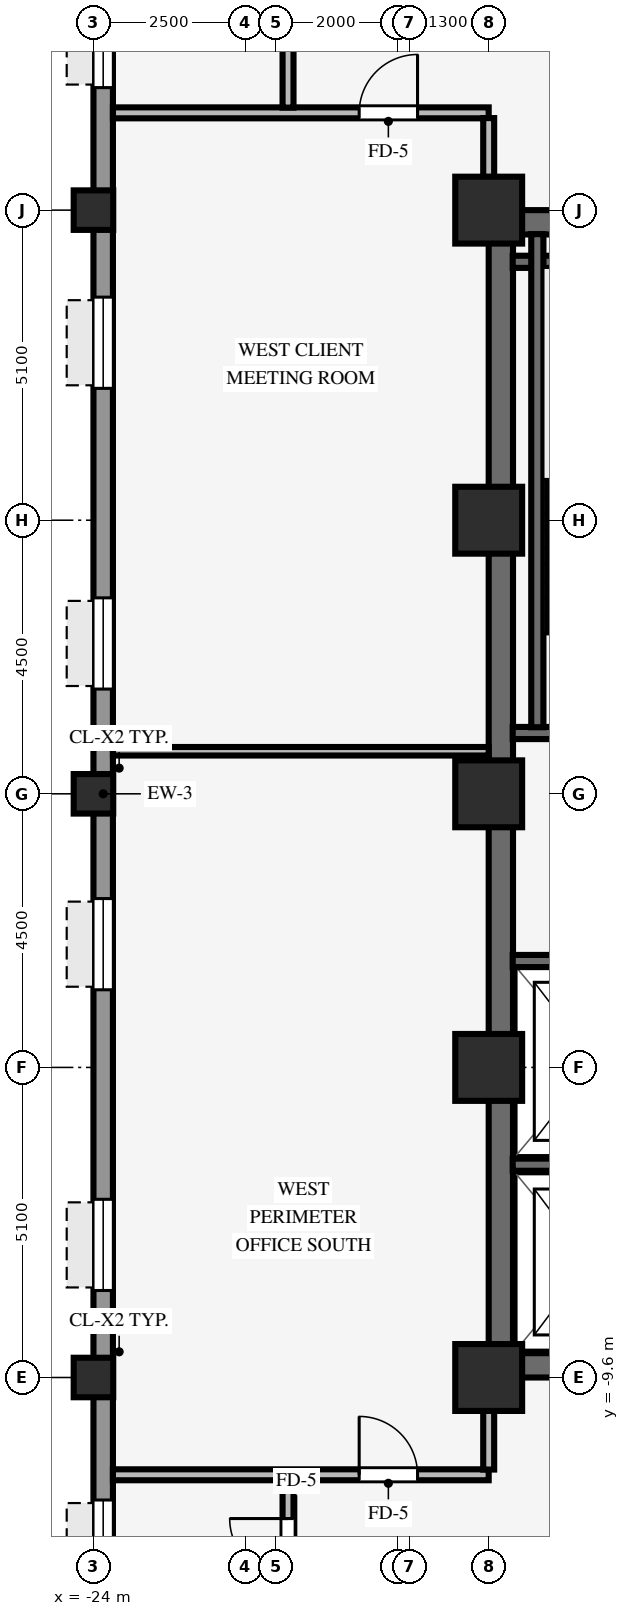
"""IFC4 building model, lengths in metres.
Left out: names, types, materials, properties, quantities, classifications, styles, units other than length and angle.
Written with IfcOpenShell. Run it as: python <this file> out.ifc"""

import sys

from ifc_helpers import new_model, si_unit, direction, frame, frame_2d, origin, origin_2d, place, context, subcontext, project, spatial, rectangle, hollow_rectangle, extrude, source, transform, mapped, element, fill, save


model = new_model("IFC4")
c1 = context("Model", 3, precision=1e-05, world=origin(), true_north=direction((0.0, 1.0)))
c2 = subcontext(c1, "Body", "Model", "MODEL_VIEW")
j1 = project(units=[si_unit("LENGTHUNIT", "METRE"), si_unit("PLANEANGLEUNIT", "RADIAN")], contexts=[c1])
p1 = place(None, origin())
s1 = spatial("IfcSite", under=j1, at=p1, CompositionType="ELEMENT")
p2 = place(p1, origin())
s2 = spatial("IfcBuilding", under=s1, at=p2, CompositionType="ELEMENT")
p3 = place(p2, frame((0.0, 0.0, 98.3)))
s3 = spatial("IfcBuildingStorey", under=s2, at=p3, CompositionType="ELEMENT", Elevation=98.3)
for number, where, z_axis, x_axis in (
    (1, (-17.5, -9.4, 0.0), (0.0, 0.0, 1.0), (1.0, 0.0, 0.0)),
    (2, (-17.5, 9.4, 0.0), (0.0, 0.0, 1.0), (1.0, 0.0, 0.0)),
):
    element("IfcWall", number, at=place(p3, frame(where, z_axis=z_axis, x_axis=x_axis)), inside=s3, PredefinedType="SHEAR", context=c2, shape_type="SweptSolid", body=[
        extrude(rectangle(XDim=8.5, YDim=0.4, at=frame_2d((4.25, 0.0))), origin(), (0.0, 0.0, 1.0), 3.37),
    ])
p4 = place(p3, frame((-17.3, -9.205, 0.0), z_axis=(0.0, 0.0, 1.0), x_axis=(0.0, 1.0, 0.0)))
e3 = element("IfcWall", 3, at=p4, inside=s3, PredefinedType="SHEAR", context=c2, shape_type="SweptSolid", body=[
    extrude(rectangle(XDim=18.41, YDim=0.4, at=frame_2d((9.205, 0.0))), origin(), (0.0, 0.0, 1.0), 3.37),
])
for number, where, z_axis, x_axis in (
    (4, (-17.5, -9.6, 0.0), (0.0, 0.0, 1.0), (1.0, 0.0, 0.0)),
    (5, (-17.5, -4.5, 0.0), (0.0, 0.0, 1.0), (1.0, 0.0, 0.0)),
    (6, (-17.5, 4.5, 0.0), (0.0, 0.0, 1.0), (1.0, 0.0, 0.0)),
    (7, (-17.5, 9.6, 0.0), (0.0, 0.0, 1.0), (1.0, 0.0, 0.0)),
    (8, (-17.5, 0.0, 0.0), (0.0, 0.0, 1.0), (1.0, 0.0, 0.0)),
):
    element("IfcColumn", number, at=place(p3, frame(where, z_axis=z_axis, x_axis=x_axis)), inside=s3, PredefinedType="COLUMN", context=c2, shape_type="SweptSolid", body=[
        extrude(rectangle(XDim=1.1, YDim=1.1, at=origin_2d()), origin(), (0.0, 0.0, 1.0), 3.37),
    ])
for number, where, z_axis, x_axis in (
    (9, (-24.0, -9.6, 0.0), (0.0, 0.0, 1.0), (1.0, 0.0, 0.0)),
    (10, (-24.0, 0.0, 0.0), (0.0, 0.0, 1.0), (1.0, 0.0, 0.0)),
    (11, (-24.0, 9.6, 0.0), (0.0, 0.0, 1.0), (1.0, 0.0, 0.0)),
):
    element("IfcColumn", number, at=place(p3, frame(where, z_axis=z_axis, x_axis=x_axis)), inside=s3, PredefinedType="COLUMN", context=c2, shape_type="SweptSolid", body=[
        extrude(hollow_rectangle(XDim=0.65, YDim=0.65, WallThickness=0.04, InnerFilletRadius=0.04, OuterFilletRadius=0.08, at=origin_2d()), origin(), (0.0, 0.0, 1.0), 3.37),
    ])
p5 = place(p3, frame((-23.84, -20.784, 0.0), z_axis=(0.0, 0.0, 1.0), x_axis=(0.0, 1.0, 0.0)))
e12 = element("IfcWall", 12, at=p5, inside=s3, PredefinedType="STANDARD", context=c2, shape_type="SweptSolid", body=[
    extrude(rectangle(XDim=41.568, YDim=0.32, at=frame_2d((20.784, 0.0))), origin(), (0.0, 0.0, 1.0), 2.705),
])
p6 = place(p5, frame((1.373, 0.0, 0.8)))
e13 = element("IfcOpeningElement", 13, at=p6, cuts=e12, PredefinedType="OPENING", context=c2, shape_type="SweptSolid", body=[
    extrude(rectangle(XDim=1.5, YDim=1.6, at=frame_2d((0.75, 0.8))), frame((0.0, 0.17, 0.0), z_axis=(0.0, -1.0, 0.0), x_axis=(1.0, 0.0, 0.0)), (0.0, 0.0, 1.0), 0.34),
])
p7 = place(p5, frame((7.669, 0.0, 0.8)))
e14 = element("IfcOpeningElement", 14, at=p7, cuts=e12, PredefinedType="OPENING", context=c2, shape_type="SweptSolid", body=[
    extrude(rectangle(XDim=1.5, YDim=1.6, at=frame_2d((0.75, 0.8))), frame((0.0, 0.17, 0.0), z_axis=(0.0, -1.0, 0.0), x_axis=(1.0, 0.0, 0.0)), (0.0, 0.0, 1.0), 0.34),
])
p8 = place(p5, frame((12.615, 0.0, 0.8)))
e15 = element("IfcOpeningElement", 15, at=p8, cuts=e12, PredefinedType="OPENING", context=c2, shape_type="SweptSolid", body=[
    extrude(rectangle(XDim=1.5, YDim=1.6, at=frame_2d((0.75, 0.8))), frame((0.0, 0.17, 0.0), z_axis=(0.0, -1.0, 0.0), x_axis=(1.0, 0.0, 0.0)), (0.0, 0.0, 1.0), 0.34),
])
p9 = place(p5, frame((17.561, 0.0, 0.8)))
e16 = element("IfcOpeningElement", 16, at=p9, cuts=e12, PredefinedType="OPENING", context=c2, shape_type="SweptSolid", body=[
    extrude(rectangle(XDim=1.5, YDim=1.6, at=frame_2d((0.75, 0.8))), frame((0.0, 0.17, 0.0), z_axis=(0.0, -1.0, 0.0), x_axis=(1.0, 0.0, 0.0)), (0.0, 0.0, 1.0), 0.34),
])
p10 = place(p5, frame((22.507, 0.0, 0.8)))
e17 = element("IfcOpeningElement", 17, at=p10, cuts=e12, PredefinedType="OPENING", context=c2, shape_type="SweptSolid", body=[
    extrude(rectangle(XDim=1.5, YDim=1.6, at=frame_2d((0.75, 0.8))), frame((0.0, 0.17, 0.0), z_axis=(0.0, -1.0, 0.0), x_axis=(1.0, 0.0, 0.0)), (0.0, 0.0, 1.0), 0.34),
])
p11 = place(p5, frame((27.453, 0.0, 0.8)))
e18 = element("IfcOpeningElement", 18, at=p11, cuts=e12, PredefinedType="OPENING", context=c2, shape_type="SweptSolid", body=[
    extrude(rectangle(XDim=1.5, YDim=1.6, at=frame_2d((0.75, 0.8))), frame((0.0, 0.17, 0.0), z_axis=(0.0, -1.0, 0.0), x_axis=(1.0, 0.0, 0.0)), (0.0, 0.0, 1.0), 0.34),
])
p12 = place(p5, frame((32.399, 0.0, 0.8)))
e19 = element("IfcOpeningElement", 19, at=p12, cuts=e12, PredefinedType="OPENING", context=c2, shape_type="SweptSolid", body=[
    extrude(rectangle(XDim=1.5, YDim=1.6, at=frame_2d((0.75, 0.8))), frame((0.0, 0.17, 0.0), z_axis=(0.0, -1.0, 0.0), x_axis=(1.0, 0.0, 0.0)), (0.0, 0.0, 1.0), 0.34),
])
p13 = place(p5, frame((38.695, 0.0, 0.8)))
e20 = element("IfcOpeningElement", 20, at=p13, cuts=e12, PredefinedType="OPENING", context=c2, shape_type="SweptSolid", body=[
    extrude(rectangle(XDim=1.5, YDim=1.6, at=frame_2d((0.75, 0.8))), frame((0.0, 0.17, 0.0), z_axis=(0.0, -1.0, 0.0), x_axis=(1.0, 0.0, 0.0)), (0.0, 0.0, 1.0), 0.34),
])
for number, where, z_axis, x_axis in (
    (21, (-17.105, 1.0, 0.0), (0.0, 0.0, 1.0), (1.0, 0.0, 0.0)),
    (22, (-17.105, 8.75, 0.0), (0.0, 0.0, 1.0), (1.0, 0.0, 0.0)),
):
    element("IfcWall", number, at=place(p3, frame(where, z_axis=z_axis, x_axis=x_axis)), inside=s3, PredefinedType="SHEAR", context=c2, shape_type="SweptSolid", body=[
        extrude(rectangle(XDim=3.57, YDim=0.2, at=frame_2d((1.785, 0.0))), origin(), (0.0, 0.0, 1.0), 3.37),
    ])
p14 = place(p3, frame((-16.7, 1.095, 0.0), z_axis=(0.0, 0.0, 1.0), x_axis=(0.0, 1.0, 0.0)))
e23 = element("IfcWall", 23, at=p14, inside=s3, PredefinedType="SHEAR", context=c2, shape_type="SweptSolid", body=[
    extrude(rectangle(XDim=8.11, YDim=0.2, at=frame_2d((4.055, 0.0))), origin(), (0.0, 0.0, 1.0), 3.37),
])
p15 = place(p3, frame((-17.105, -6.1, 0.0), z_axis=(0.0, 0.0, 1.0), x_axis=(1.0, 0.0, 0.0)))
e24 = element("IfcWall", 24, at=p15, inside=s3, PredefinedType="SHEAR", context=c2, shape_type="SweptSolid", body=[
    extrude(rectangle(XDim=2.855, YDim=0.2, at=frame_2d((1.427, 0.0))), origin(), (0.0, 0.0, 1.0), 3.37),
])
p16 = place(p3, frame((-17.105, -2.75, 0.0), z_axis=(0.0, 0.0, 1.0), x_axis=(1.0, 0.0, 0.0)))
e25 = element("IfcWall", 25, at=p16, inside=s3, PredefinedType="SHEAR", context=c2, shape_type="SweptSolid", body=[
    extrude(rectangle(XDim=2.66, YDim=0.2, at=frame_2d((1.33, 0.0))), origin(), (0.0, 0.0, 1.0), 3.37),
])
p17 = place(p3, frame((-23.68, -11.2, 0.0), z_axis=(0.0, 0.0, 1.0), x_axis=(1.0, 0.0, 0.0)))
e26 = element("IfcWall", 26, at=p17, inside=s3, PredefinedType="PARTITIONING", context=c2, shape_type="SweptSolid", body=[
    extrude(rectangle(XDim=6.18, YDim=0.18, at=frame_2d((3.09, 0.0))), origin(), (0.0, 0.0, 1.0), 3.36),
])
p18 = place(p17, frame((4.05, 0.0, 0.0)))
e27 = element("IfcOpeningElement", 27, at=p18, cuts=e26, PredefinedType="OPENING", context=c2, shape_type="SweptSolid", body=[
    extrude(rectangle(XDim=0.96, YDim=2.1, at=frame_2d((0.48, 1.05))), frame((0.0, 0.1, 0.0), z_axis=(0.0, -1.0, 0.0), x_axis=(1.0, 0.0, 0.0)), (0.0, 0.0, 1.0), 0.2),
])
p19 = place(p3, frame((-23.68, 0.7, 0.0), z_axis=(0.0, 0.0, 1.0), x_axis=(1.0, 0.0, 0.0)))
e28 = element("IfcWall", 28, at=p19, inside=s3, PredefinedType="PARTITIONING", context=c2, shape_type="SweptSolid", body=[
    extrude(rectangle(XDim=6.18, YDim=0.14, at=frame_2d((3.09, 0.0))), origin(), (0.0, 0.0, 1.0), 3.36),
])
p20 = place(p3, frame((-23.68, 11.2, 0.0), z_axis=(0.0, 0.0, 1.0), x_axis=(1.0, 0.0, 0.0)))
e29 = element("IfcWall", 29, at=p20, inside=s3, PredefinedType="PARTITIONING", context=c2, shape_type="SweptSolid", body=[
    extrude(rectangle(XDim=6.18, YDim=0.18, at=frame_2d((3.09, 0.0))), origin(), (0.0, 0.0, 1.0), 3.36),
])
p21 = place(p20, frame((4.05, 0.0, 0.0)))
e30 = element("IfcOpeningElement", 30, at=p21, cuts=e29, PredefinedType="OPENING", context=c2, shape_type="SweptSolid", body=[
    extrude(rectangle(XDim=0.96, YDim=2.1, at=frame_2d((0.48, 1.05))), frame((0.0, 0.1, 0.0), z_axis=(0.0, -1.0, 0.0), x_axis=(1.0, 0.0, 0.0)), (0.0, 0.0, 1.0), 0.2),
])
p22 = place(p3, frame((-20.8, -13.514, 0.0), z_axis=(0.0, 0.0, 1.0), x_axis=(0.0, 1.0, 0.0)))
e31 = element("IfcWall", 31, at=p22, inside=s3, PredefinedType="PARTITIONING", context=c2, shape_type="SweptSolid", body=[
    extrude(rectangle(XDim=2.228, YDim=0.18, at=frame_2d((1.114, 0.0))), origin(), (0.0, 0.0, 1.0), 3.36),
])
p23 = place(p22, frame((0.634, 0.0, 0.0)))
e32 = element("IfcOpeningElement", 32, at=p23, cuts=e31, PredefinedType="OPENING", context=c2, shape_type="SweptSolid", body=[
    extrude(rectangle(XDim=0.96, YDim=2.1, at=frame_2d((0.48, 1.05))), frame((0.0, 0.1, 0.0), z_axis=(0.0, -1.0, 0.0), x_axis=(1.0, 0.0, 0.0)), (0.0, 0.0, 1.0), 0.2),
])
p24 = place(p3, frame((-20.8, 11.286, 0.0), z_axis=(0.0, 0.0, 1.0), x_axis=(0.0, 1.0, 0.0)))
e33 = element("IfcWall", 33, at=p24, inside=s3, PredefinedType="PARTITIONING", context=c2, shape_type="SweptSolid", body=[
    extrude(rectangle(XDim=2.228, YDim=0.18, at=frame_2d((1.114, 0.0))), origin(), (0.0, 0.0, 1.0), 3.36),
])
for number, where, z_axis, x_axis in (
    (34, (-17.5, -11.114, 0.0), (0.0, 0.0, 1.0), (0.0, 1.0, 0.0)),
    (35, (-17.5, 10.146, 0.0), (0.0, 0.0, 1.0), (0.0, 1.0, 0.0)),
):
    element("IfcWall", number, at=place(p3, frame(where, z_axis=z_axis, x_axis=x_axis)), inside=s3, PredefinedType="PARTITIONING", context=c2, shape_type="SweptSolid", body=[
        extrude(rectangle(XDim=0.968, YDim=0.18, at=frame_2d((0.484, 0.0))), origin(), (0.0, 0.0, 1.0), 2.738),
    ])
m1 = source(origin(), c2, "Body", "SweptSolid", [
    extrude(rectangle(XDim=1.5, YDim=1.6, at=frame_2d((0.75, 0.8))), frame((0.0, 0.03, 0.0), z_axis=(0.0, -1.0, 0.0), x_axis=(1.0, 0.0, 0.0)), (0.0, 0.0, 1.0), 0.06),
])
p25 = place(p7, origin())
e36 = element("IfcWindow", 36, at=p25, inside=s3, PartitioningType="SINGLE_PANEL", PredefinedType="WINDOW", context=c2, shape_type="MappedRepresentation", body=[
    mapped(m1, transform((0.0, 0.0, 0.0), scale=1.0)),
])
fill(e14, e36)
p26 = place(p8, origin())
e37 = element("IfcWindow", 37, at=p26, inside=s3, PartitioningType="SINGLE_PANEL", PredefinedType="WINDOW", context=c2, shape_type="MappedRepresentation", body=[
    mapped(m1, transform((0.0, 0.0, 0.0), scale=1.0)),
])
fill(e15, e37)
p27 = place(p9, origin())
e38 = element("IfcWindow", 38, at=p27, inside=s3, PartitioningType="SINGLE_PANEL", PredefinedType="WINDOW", context=c2, shape_type="MappedRepresentation", body=[
    mapped(m1, transform((0.0, 0.0, 0.0), scale=1.0)),
])
fill(e16, e38)
p28 = place(p10, origin())
e39 = element("IfcWindow", 39, at=p28, inside=s3, PartitioningType="SINGLE_PANEL", PredefinedType="WINDOW", context=c2, shape_type="MappedRepresentation", body=[
    mapped(m1, transform((0.0, 0.0, 0.0), scale=1.0)),
])
fill(e17, e39)
p29 = place(p11, origin())
e40 = element("IfcWindow", 40, at=p29, inside=s3, PartitioningType="SINGLE_PANEL", PredefinedType="WINDOW", context=c2, shape_type="MappedRepresentation", body=[
    mapped(m1, transform((0.0, 0.0, 0.0), scale=1.0)),
])
fill(e18, e40)
p30 = place(p12, origin())
e41 = element("IfcWindow", 41, at=p30, inside=s3, PartitioningType="SINGLE_PANEL", PredefinedType="WINDOW", context=c2, shape_type="MappedRepresentation", body=[
    mapped(m1, transform((0.0, 0.0, 0.0), scale=1.0)),
])
fill(e19, e41)
m2 = source(origin(), c2, "Body", "SweptSolid", [
    extrude(rectangle(XDim=0.96, YDim=2.1, at=frame_2d((0.48, 1.05))), frame((0.0, 0.025, 0.0), z_axis=(0.0, -1.0, 0.0), x_axis=(1.0, 0.0, 0.0)), (0.0, 0.0, 1.0), 0.05),
])
p31 = place(p18, origin())
e42 = element("IfcDoor", 42, at=p31, inside=s3, OperationType="SINGLE_SWING_LEFT", PredefinedType="DOOR", context=c2, shape_type="MappedRepresentation", body=[
    mapped(m2, transform((0.0, 0.0, 0.0), scale=1.0)),
])
fill(e27, e42)
p32 = place(p21, origin())
e43 = element("IfcDoor", 43, at=p32, inside=s3, OperationType="SINGLE_SWING_RIGHT", PredefinedType="DOOR", context=c2, shape_type="MappedRepresentation", body=[
    mapped(m2, transform((0.0, 0.0, 0.0), scale=1.0)),
])
fill(e30, e43)
p33 = place(p23, origin())
e44 = element("IfcDoor", 44, at=p33, inside=s3, OperationType="SINGLE_SWING_RIGHT", PredefinedType="DOOR", context=c2, shape_type="MappedRepresentation", body=[
    mapped(m2, transform((0.0, 0.0, 0.0), scale=1.0)),
])
fill(e32, e44)
save(model, sys.argv[1])
